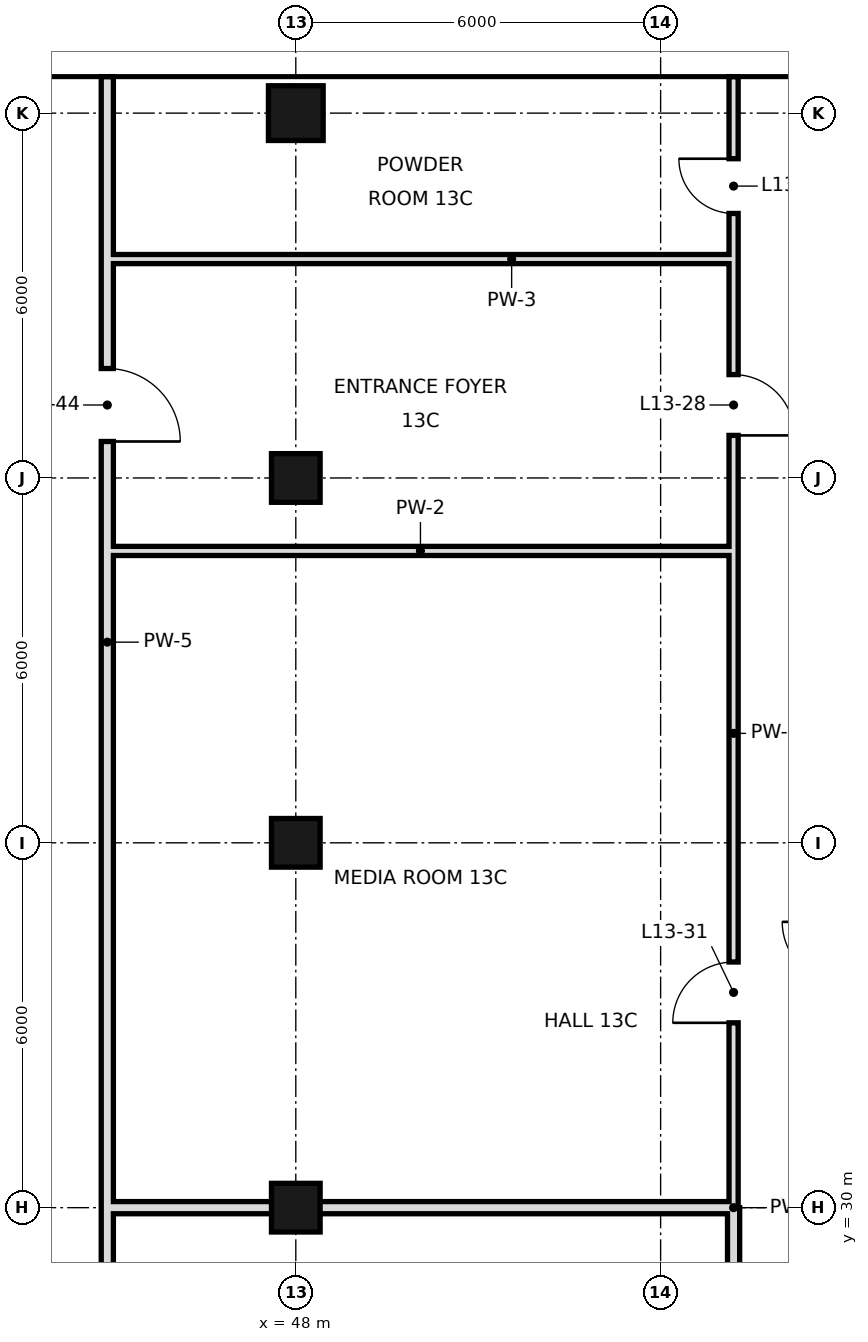
"""IFC4 building model, lengths in metres.
Left out: names, types, materials, properties, quantities, classifications, styles, units other than length and angle.
Written with IfcOpenShell. Run it as: python <this file> out.ifc"""

import sys

from ifc_helpers import new_model, si_unit, direction, frame, frame_2d, origin, origin_2d, place, context, subcontext, project, spatial, rectangle, hollow_rectangle, extrude, element, fill, save


model = new_model("IFC4")
c1 = context("Model", 3, precision=1e-05, world=origin(), true_north=direction((0.0, 1.0)))
c2 = subcontext(c1, "Body", "Model", "MODEL_VIEW")
j1 = project(units=[si_unit("LENGTHUNIT", "METRE"), si_unit("PLANEANGLEUNIT", "RADIAN")], contexts=[c1])
p1 = place(None, origin())
s1 = spatial("IfcSite", under=j1, at=p1, CompositionType="ELEMENT")
p2 = place(p1, origin())
s2 = spatial("IfcBuilding", under=s1, at=p2, CompositionType="ELEMENT")
p3 = place(p2, frame((0.0, 0.0, 67.8)))
s3 = spatial("IfcBuildingStorey", under=s2, at=p3, CompositionType="ELEMENT", Elevation=67.8)
for number, where, z_axis, x_axis in (
    (1, (48.0, 30.0, 0.0), (0.0, 0.0, 1.0), (1.0, 0.0, 0.0)),
    (2, (48.0, 36.0, 0.0), (0.0, 0.0, 1.0), (1.0, 0.0, 0.0)),
    (3, (48.0, 42.0, 0.0), (0.0, 0.0, 1.0), (1.0, 0.0, 0.0)),
):
    element("IfcColumn", number, at=place(p3, frame(where, z_axis=z_axis, x_axis=x_axis)), inside=s3, PredefinedType="COLUMN", context=c2, shape_type="SweptSolid", body=[
        extrude(hollow_rectangle(XDim=0.8, YDim=0.8, WallThickness=0.04, at=origin_2d()), origin(), (0.0, 0.0, 1.0), 3.6),
    ])
p4 = place(p3, frame((48.0, 48.0, 0.0), z_axis=(0.0, 0.0, 1.0), x_axis=(1.0, 0.0, 0.0)))
e4 = element("IfcColumn", 4, at=p4, inside=s3, PredefinedType="COLUMN", context=c2, shape_type="SweptSolid", body=[
    extrude(hollow_rectangle(XDim=0.9, YDim=0.9, WallThickness=0.045, at=origin_2d()), origin(), (0.0, 0.0, 1.0), 3.6),
])
p5 = place(p3, frame((44.9, 30.0, 0.0), z_axis=(0.0, 0.0, 1.0), x_axis=(0.0, 1.0, 0.0)))
e5 = element("IfcWall", 5, at=p5, inside=s3, PredefinedType="SOLIDWALL", context=c2, shape_type="SweptSolid", body=[
    extrude(rectangle(XDim=18.6, YDim=0.2, at=frame_2d((9.3, 0.0))), origin(), (0.0, 0.0, 1.0), 2.72),
])
p6 = place(p5, frame((12.6, 0.0, 0.0)))
e6 = element("IfcOpeningElement", 6, at=p6, cuts=e5, PredefinedType="OPENING", context=c2, shape_type="SweptSolid", body=[
    extrude(rectangle(XDim=1.2, YDim=2.4, at=frame_2d((0.6, 1.2))), frame((0.0, 0.11, 0.0), z_axis=(0.0, -1.0, 0.0), x_axis=(1.0, 0.0, 0.0)), (0.0, 0.0, 1.0), 0.22),
])
p7 = place(p3, frame((44.9, 25.8, 0.0), z_axis=(0.0, 0.0, 1.0), x_axis=(0.0, 1.0, 0.0)))
e7 = element("IfcWall", 7, at=p7, inside=s3, PredefinedType="SOLIDWALL", context=c2, shape_type="SweptSolid", body=[
    extrude(rectangle(XDim=4.2, YDim=0.2, at=frame_2d((2.1, 0.0))), origin(), (0.0, 0.0, 1.0), 2.97),
])
p8 = place(p3, frame((55.2, 25.8, 0.0), z_axis=(0.0, 0.0, 1.0), x_axis=(0.0, 1.0, 0.0)))
e8 = element("IfcWall", 8, at=p8, inside=s3, PredefinedType="SOLIDWALL", context=c2, shape_type="SweptSolid", body=[
    extrude(rectangle(XDim=4.2, YDim=0.2, at=frame_2d((2.1, 0.0))), origin(), (0.0, 0.0, 1.0), 2.52),
])
p9 = place(p8, frame((1.6, 0.0, 0.0)))
e9 = element("IfcOpeningElement", 9, at=p9, cuts=e8, PredefinedType="OPENING", context=c2, shape_type="SweptSolid", body=[
    extrude(rectangle(XDim=1.0, YDim=2.4, at=frame_2d((0.5, 1.2))), frame((0.0, 0.11, 0.0), z_axis=(0.0, -1.0, 0.0), x_axis=(1.0, 0.0, 0.0)), (0.0, 0.0, 1.0), 0.22),
])
p10 = place(p3, frame((55.2, 30.0, 0.0), z_axis=(0.0, 0.0, 1.0), x_axis=(0.0, 1.0, 0.0)))
e10 = element("IfcWall", 10, at=p10, inside=s3, PredefinedType="PARTITIONING", context=c2, shape_type="SweptSolid", body=[
    extrude(rectangle(XDim=15.6, YDim=0.15, at=frame_2d((7.8, 0.0))), origin(), (0.0, 0.0, 1.0), 3.42),
])
p11 = place(p10, frame((12.7, 0.0, 0.0)))
e11 = element("IfcOpeningElement", 11, at=p11, cuts=e10, PredefinedType="OPENING", context=c2, shape_type="SweptSolid", body=[
    extrude(rectangle(XDim=1.0, YDim=2.4, at=frame_2d((0.5, 1.2))), frame((0.0, 0.085, 0.0), z_axis=(0.0, -1.0, 0.0), x_axis=(1.0, 0.0, 0.0)), (0.0, 0.0, 1.0), 0.17),
])
p12 = place(p10, frame((3.04, 0.0, 0.0)))
e12 = element("IfcOpeningElement", 12, at=p12, cuts=e10, PredefinedType="OPENING", context=c2, shape_type="SweptSolid", body=[
    extrude(rectangle(XDim=1.0, YDim=2.4, at=frame_2d((0.5, 1.2))), frame((0.0, 0.085, 0.0), z_axis=(0.0, -1.0, 0.0), x_axis=(1.0, 0.0, 0.0)), (0.0, 0.0, 1.0), 0.17),
])
p13 = place(p3, frame((55.2, 45.6, 0.0), z_axis=(0.0, 0.0, 1.0), x_axis=(0.0, 1.0, 0.0)))
e13 = element("IfcWall", 13, at=p13, inside=s3, PredefinedType="PARTITIONING", context=c2, shape_type="SweptSolid", body=[
    extrude(rectangle(XDim=3.0, YDim=0.15, at=frame_2d((1.5, 0.0))), origin(), (0.0, 0.0, 1.0), 3.42),
])
p14 = place(p13, frame((0.75, 0.0, 0.0)))
e14 = element("IfcOpeningElement", 14, at=p14, cuts=e13, PredefinedType="OPENING", context=c2, shape_type="SweptSolid", body=[
    extrude(rectangle(XDim=0.9, YDim=2.4, at=frame_2d((0.45, 1.2))), frame((0.0, 0.085, 0.0), z_axis=(0.0, -1.0, 0.0), x_axis=(1.0, 0.0, 0.0)), (0.0, 0.0, 1.0), 0.17),
])
p15 = place(p3, frame((44.9, 30.0, 0.0), z_axis=(0.0, 0.0, 1.0), x_axis=(1.0, 0.0, 0.0)))
e15 = element("IfcWall", 15, at=p15, inside=s3, PredefinedType="SOLIDWALL", context=c2, shape_type="SweptSolid", body=[
    extrude(rectangle(XDim=10.3, YDim=0.2, at=frame_2d((5.15, 0.0))), origin(), (0.0, 0.0, 1.0), 2.52),
])
for number, where, z_axis, x_axis in (
    (16, (44.9, 40.8, 0.0), (0.0, 0.0, 1.0), (1.0, 0.0, 0.0)),
    (17, (44.9, 45.6, 0.0), (0.0, 0.0, 1.0), (1.0, 0.0, 0.0)),
):
    element("IfcWall", number, at=place(p3, frame(where, z_axis=z_axis, x_axis=x_axis)), inside=s3, PredefinedType="PARTITIONING", context=c2, shape_type="SweptSolid", body=[
        extrude(rectangle(XDim=10.3, YDim=0.15, at=frame_2d((5.15, 0.0))), origin(), (0.0, 0.0, 1.0), 3.42),
    ])
p16 = place(p11, frame((1.0, 0.0, 0.0), z_axis=(0.0, 0.0, 1.0), x_axis=(-1.0, 0.0, 0.0)))
e18 = element("IfcDoor", 18, at=p16, inside=s3, OperationType="SINGLE_SWING_RIGHT", PredefinedType="DOOR", context=c2, shape_type="SweptSolid", body=[
    extrude(rectangle(XDim=1.0, YDim=2.4, at=frame_2d((0.5, 1.2))), frame((0.0, 0.025, 0.0), z_axis=(0.0, -1.0, 0.0), x_axis=(1.0, 0.0, 0.0)), (0.0, 0.0, 1.0), 0.05),
])
fill(e11, e18)
p17 = place(p12, origin())
e19 = element("IfcDoor", 19, at=p17, inside=s3, OperationType="SINGLE_SWING_LEFT", PredefinedType="DOOR", context=c2, shape_type="SweptSolid", body=[
    extrude(rectangle(XDim=1.0, YDim=2.4, at=frame_2d((0.5, 1.2))), frame((0.0, 0.025, 0.0), z_axis=(0.0, -1.0, 0.0), x_axis=(1.0, 0.0, 0.0)), (0.0, 0.0, 1.0), 0.05),
])
fill(e12, e19)
p18 = place(p14, frame((0.9, 0.0, 0.0), z_axis=(0.0, 0.0, 1.0), x_axis=(-1.0, 0.0, 0.0)))
e20 = element("IfcDoor", 20, at=p18, inside=s3, OperationType="SINGLE_SWING_LEFT", PredefinedType="DOOR", context=c2, shape_type="SweptSolid", body=[
    extrude(rectangle(XDim=0.9, YDim=2.4, at=frame_2d((0.45, 1.2))), frame((0.0, 0.025, 0.0), z_axis=(0.0, -1.0, 0.0), x_axis=(1.0, 0.0, 0.0)), (0.0, 0.0, 1.0), 0.05),
])
fill(e14, e20)
p19 = place(p6, frame((1.2, 0.0, 0.0), z_axis=(0.0, 0.0, 1.0), x_axis=(-1.0, 0.0, 0.0)))
e21 = element("IfcDoor", 21, at=p19, inside=s3, OperationType="SINGLE_SWING_RIGHT", PredefinedType="DOOR", context=c2, shape_type="SweptSolid", body=[
    extrude(rectangle(XDim=1.2, YDim=2.4, at=frame_2d((0.6, 1.2))), frame((0.0, 0.025, 0.0), z_axis=(0.0, -1.0, 0.0), x_axis=(1.0, 0.0, 0.0)), (0.0, 0.0, 1.0), 0.05),
])
fill(e6, e21)
save(model, sys.argv[1])
